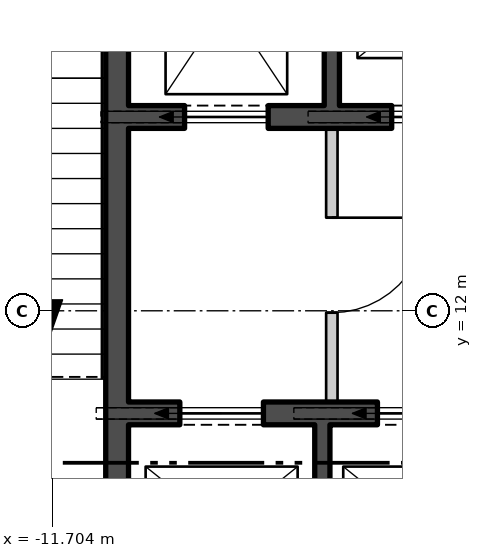
"""IFC4 building model, lengths in metres.
Left out: names, types, materials, properties, quantities, classifications, styles, units other than length and angle.
Written with IfcOpenShell. Run it as: python <this file> out.ifc"""

import sys

from ifc_helpers import new_model, si_unit, direction, frame, frame_2d, origin, place, context, subcontext, project, spatial, polyline, rectangle, outline, extrude, element, fill, save


model = new_model("IFC4")
c1 = context("Model", 3, precision=1e-05, world=origin(), true_north=direction((0.0, 1.0)))
c2 = subcontext(c1, "Body", "Model", "MODEL_VIEW")
j1 = project(units=[si_unit("LENGTHUNIT", "METRE"), si_unit("PLANEANGLEUNIT", "RADIAN")], contexts=[c1])
p1 = place(None, origin())
s1 = spatial("IfcSite", under=j1, at=p1, CompositionType="ELEMENT")
p2 = place(p1, origin())
s2 = spatial("IfcBuilding", under=s1, at=p2, CompositionType="ELEMENT")
p3 = place(p2, frame((0.0, 0.0, 280.5)))
s3 = spatial("IfcBuildingStorey", under=s2, at=p3, CompositionType="ELEMENT", Elevation=280.5)
p4 = place(p3, frame((-25.385, 15.619, -0.18), z_axis=(0.0, 0.0, 1.0), x_axis=(0.500000711659, -0.866024992908, 0.0)))
e1 = element("IfcWall", 1, at=p4, inside=s3, PredefinedType="SOLIDWALL", context=c2, shape_type="SweptSolid", body=[
    extrude(outline(polyline([(-0.13, -0.225), (45.87, -0.225), (45.61, 0.225), (0.13, 0.225), (-0.13, -0.225)])), origin(), (0.0, 0.0, 1.0), 3.68),
])
p5 = place(p4, frame((1.424, 0.0, 1.08)))
e2 = element("IfcOpeningElement", 2, at=p5, cuts=e1, PredefinedType="OPENING", context=c2, shape_type="SweptSolid", body=[
    extrude(rectangle(XDim=2.4, YDim=2.0, at=frame_2d((1.2, 1.0))), frame((0.0, 0.235, 0.0), z_axis=(0.0, -1.0, 0.0), x_axis=(1.0, 0.0, 0.0)), (0.0, 0.0, 1.0), 0.47),
])
p6 = place(p4, frame((5.893, 0.0, 1.08)))
e3 = element("IfcOpeningElement", 3, at=p6, cuts=e1, PredefinedType="OPENING", context=c2, shape_type="SweptSolid", body=[
    extrude(rectangle(XDim=2.4, YDim=2.0, at=frame_2d((1.2, 1.0))), frame((0.0, 0.235, 0.0), z_axis=(0.0, -1.0, 0.0), x_axis=(1.0, 0.0, 0.0)), (0.0, 0.0, 1.0), 0.47),
])
p7 = place(p4, frame((10.401, 0.0, 1.08)))
e4 = element("IfcOpeningElement", 4, at=p7, cuts=e1, PredefinedType="OPENING", context=c2, shape_type="SweptSolid", body=[
    extrude(rectangle(XDim=2.4, YDim=2.0, at=frame_2d((1.2, 1.0))), frame((0.0, 0.235, 0.0), z_axis=(0.0, -1.0, 0.0), x_axis=(1.0, 0.0, 0.0)), (0.0, 0.0, 1.0), 0.47),
])
p8 = place(p4, frame((14.909, 0.0, 1.08)))
e5 = element("IfcOpeningElement", 5, at=p8, cuts=e1, PredefinedType="OPENING", context=c2, shape_type="SweptSolid", body=[
    extrude(rectangle(XDim=2.4, YDim=2.0, at=frame_2d((1.2, 1.0))), frame((0.0, 0.235, 0.0), z_axis=(0.0, -1.0, 0.0), x_axis=(1.0, 0.0, 0.0)), (0.0, 0.0, 1.0), 0.47),
])
p9 = place(p4, frame((19.416, 0.0, 1.08)))
e6 = element("IfcOpeningElement", 6, at=p9, cuts=e1, PredefinedType="OPENING", context=c2, shape_type="SweptSolid", body=[
    extrude(rectangle(XDim=2.4, YDim=2.0, at=frame_2d((1.2, 1.0))), frame((0.0, 0.235, 0.0), z_axis=(0.0, -1.0, 0.0), x_axis=(1.0, 0.0, 0.0)), (0.0, 0.0, 1.0), 0.47),
])
p10 = place(p4, frame((23.924, 0.0, 1.08)))
e7 = element("IfcOpeningElement", 7, at=p10, cuts=e1, PredefinedType="OPENING", context=c2, shape_type="SweptSolid", body=[
    extrude(rectangle(XDim=2.4, YDim=2.0, at=frame_2d((1.2, 1.0))), frame((0.0, 0.235, 0.0), z_axis=(0.0, -1.0, 0.0), x_axis=(1.0, 0.0, 0.0)), (0.0, 0.0, 1.0), 0.47),
])
p11 = place(p4, frame((28.431, 0.0, 1.08)))
e8 = element("IfcOpeningElement", 8, at=p11, cuts=e1, PredefinedType="OPENING", context=c2, shape_type="SweptSolid", body=[
    extrude(rectangle(XDim=2.4, YDim=2.0, at=frame_2d((1.2, 1.0))), frame((0.0, 0.235, 0.0), z_axis=(0.0, -1.0, 0.0), x_axis=(1.0, 0.0, 0.0)), (0.0, 0.0, 1.0), 0.47),
])
p12 = place(p4, frame((32.939, 0.0, 1.08)))
e9 = element("IfcOpeningElement", 9, at=p12, cuts=e1, PredefinedType="OPENING", context=c2, shape_type="SweptSolid", body=[
    extrude(rectangle(XDim=2.4, YDim=2.0, at=frame_2d((1.2, 1.0))), frame((0.0, 0.235, 0.0), z_axis=(0.0, -1.0, 0.0), x_axis=(1.0, 0.0, 0.0)), (0.0, 0.0, 1.0), 0.47),
])
p13 = place(p4, frame((37.447, 0.0, 1.08)))
e10 = element("IfcOpeningElement", 10, at=p13, cuts=e1, PredefinedType="OPENING", context=c2, shape_type="SweptSolid", body=[
    extrude(rectangle(XDim=2.4, YDim=2.0, at=frame_2d((1.2, 1.0))), frame((0.0, 0.235, 0.0), z_axis=(0.0, -1.0, 0.0), x_axis=(1.0, 0.0, 0.0)), (0.0, 0.0, 1.0), 0.47),
])
p14 = place(p4, frame((41.916, 0.0, 1.08)))
e11 = element("IfcOpeningElement", 11, at=p14, cuts=e1, PredefinedType="OPENING", context=c2, shape_type="SweptSolid", body=[
    extrude(rectangle(XDim=2.4, YDim=2.0, at=frame_2d((1.2, 1.0))), frame((0.0, 0.235, 0.0), z_axis=(0.0, -1.0, 0.0), x_axis=(1.0, 0.0, 0.0)), (0.0, 0.0, 1.0), 0.47),
])
p15 = place(p3, frame((-10.85, 4.4, 0.0), z_axis=(0.0, 0.0, 1.0), x_axis=(0.0, 1.0, 0.0)))
e12 = element("IfcWall", 12, at=p15, inside=s3, PredefinedType="SHEAR", context=c2, shape_type="SweptSolid", body=[
    extrude(rectangle(XDim=13.2, YDim=0.3, at=frame_2d((6.6, 0.0))), origin(), (0.0, 0.0, 1.0), 3.7),
])
p16 = place(p15, frame((1.575, 0.0, 0.0)))
e13 = element("IfcOpeningElement", 13, at=p16, cuts=e12, PredefinedType="OPENING", context=c2, shape_type="SweptSolid", body=[
    extrude(rectangle(XDim=1.25, YDim=2.1, at=frame_2d((0.625, 1.05))), frame((0.0, 0.16, 0.0), z_axis=(0.0, -1.0, 0.0), x_axis=(1.0, 0.0, 0.0)), (0.0, 0.0, 1.0), 0.32),
])
p17 = place(p15, frame((0.4, 0.0, 0.0)))
e14 = element("IfcOpeningElement", 14, at=p17, cuts=e12, PredefinedType="OPENING", context=c2, shape_type="SweptSolid", body=[
    extrude(rectangle(XDim=0.9, YDim=2.1, at=frame_2d((0.45, 1.05))), frame((0.0, 0.16, 0.0), z_axis=(0.0, -1.0, 0.0), x_axis=(1.0, 0.0, 0.0)), (0.0, 0.0, 1.0), 0.32),
])
p18 = place(p3, frame((-10.7, 14.55, 0.0), z_axis=(0.0, 0.0, 1.0), x_axis=(1.0, 0.0, 0.0)))
e15 = element("IfcWall", 15, at=p18, inside=s3, PredefinedType="SHEAR", context=c2, shape_type="SweptSolid", body=[
    extrude(rectangle(XDim=21.4, YDim=0.3, at=frame_2d((10.7, 0.0))), origin(), (0.0, 0.0, 1.0), 3.7),
])
p19 = place(p18, frame((0.738, 0.0, 0.0)))
e16 = element("IfcOpeningElement", 16, at=p19, cuts=e15, PredefinedType="OPENING", context=c2, shape_type="SweptSolid", body=[
    extrude(rectangle(XDim=1.1, YDim=2.1, at=frame_2d((0.55, 1.05))), frame((0.0, 0.16, 0.0), z_axis=(0.0, -1.0, 0.0), x_axis=(1.0, 0.0, 0.0)), (0.0, 0.0, 1.0), 0.32),
])
p20 = place(p18, frame((3.462, 0.0, 0.0)))
e17 = element("IfcOpeningElement", 17, at=p20, cuts=e15, PredefinedType="OPENING", context=c2, shape_type="SweptSolid", body=[
    extrude(rectangle(XDim=1.1, YDim=2.1, at=frame_2d((0.55, 1.05))), frame((0.0, 0.16, 0.0), z_axis=(0.0, -1.0, 0.0), x_axis=(1.0, 0.0, 0.0)), (0.0, 0.0, 1.0), 0.32),
])
p21 = place(p18, frame((6.138, 0.0, 0.0)))
e18 = element("IfcOpeningElement", 18, at=p21, cuts=e15, PredefinedType="OPENING", context=c2, shape_type="SweptSolid", body=[
    extrude(rectangle(XDim=1.1, YDim=2.1, at=frame_2d((0.55, 1.05))), frame((0.0, 0.16, 0.0), z_axis=(0.0, -1.0, 0.0), x_axis=(1.0, 0.0, 0.0)), (0.0, 0.0, 1.0), 0.32),
])
p22 = place(p18, frame((8.812, 0.0, 0.0)))
e19 = element("IfcOpeningElement", 19, at=p22, cuts=e15, PredefinedType="OPENING", context=c2, shape_type="SweptSolid", body=[
    extrude(rectangle(XDim=1.1, YDim=2.1, at=frame_2d((0.55, 1.05))), frame((0.0, 0.16, 0.0), z_axis=(0.0, -1.0, 0.0), x_axis=(1.0, 0.0, 0.0)), (0.0, 0.0, 1.0), 0.32),
])
p23 = place(p18, frame((19.562, 0.0, 0.0)))
e20 = element("IfcOpeningElement", 20, at=p23, cuts=e15, PredefinedType="OPENING", context=c2, shape_type="SweptSolid", body=[
    extrude(rectangle(XDim=1.1, YDim=2.1, at=frame_2d((0.55, 1.05))), frame((0.0, 0.16, 0.0), z_axis=(0.0, -1.0, 0.0), x_axis=(1.0, 0.0, 0.0)), (0.0, 0.0, 1.0), 0.32),
])
p24 = place(p18, frame((11.537, 0.0, 0.0)))
e21 = element("IfcOpeningElement", 21, at=p24, cuts=e15, PredefinedType="OPENING", context=c2, shape_type="SweptSolid", body=[
    extrude(rectangle(XDim=1.0, YDim=2.1, at=frame_2d((0.5, 1.05))), frame((0.0, 0.16, 0.0), z_axis=(0.0, -1.0, 0.0), x_axis=(1.0, 0.0, 0.0)), (0.0, 0.0, 1.0), 0.32),
])
p25 = place(p18, frame((14.213, 0.0, 0.0)))
e22 = element("IfcOpeningElement", 22, at=p25, cuts=e15, PredefinedType="OPENING", context=c2, shape_type="SweptSolid", body=[
    extrude(rectangle(XDim=1.0, YDim=2.1, at=frame_2d((0.5, 1.05))), frame((0.0, 0.16, 0.0), z_axis=(0.0, -1.0, 0.0), x_axis=(1.0, 0.0, 0.0)), (0.0, 0.0, 1.0), 0.32),
])
p26 = place(p18, frame((16.887, 0.0, 0.0)))
e23 = element("IfcOpeningElement", 23, at=p26, cuts=e15, PredefinedType="OPENING", context=c2, shape_type="SweptSolid", body=[
    extrude(rectangle(XDim=1.0, YDim=2.1, at=frame_2d((0.5, 1.05))), frame((0.0, 0.16, 0.0), z_axis=(0.0, -1.0, 0.0), x_axis=(1.0, 0.0, 0.0)), (0.0, 0.0, 1.0), 0.32),
])
p27 = place(p3, frame((-10.7, 10.65, 0.0), z_axis=(0.0, 0.0, 1.0), x_axis=(1.0, 0.0, 0.0)))
e24 = element("IfcWall", 24, at=p27, inside=s3, PredefinedType="SHEAR", context=c2, shape_type="SweptSolid", body=[
    extrude(rectangle(XDim=10.3, YDim=0.3, at=frame_2d((5.15, 0.0))), origin(), (0.0, 0.0, 1.0), 3.7),
])
p28 = place(p27, frame((0.675, 0.0, 0.0)))
e25 = element("IfcOpeningElement", 25, at=p28, cuts=e24, PredefinedType="OPENING", context=c2, shape_type="SweptSolid", body=[
    extrude(rectangle(XDim=1.1, YDim=2.1, at=frame_2d((0.55, 1.05))), frame((0.0, 0.16, 0.0), z_axis=(0.0, -1.0, 0.0), x_axis=(1.0, 0.0, 0.0)), (0.0, 0.0, 1.0), 0.32),
])
p29 = place(p27, frame((3.275, 0.0, 0.0)))
e26 = element("IfcOpeningElement", 26, at=p29, cuts=e24, PredefinedType="OPENING", context=c2, shape_type="SweptSolid", body=[
    extrude(rectangle(XDim=1.1, YDim=2.1, at=frame_2d((0.55, 1.05))), frame((0.0, 0.16, 0.0), z_axis=(0.0, -1.0, 0.0), x_axis=(1.0, 0.0, 0.0)), (0.0, 0.0, 1.0), 0.32),
])
p30 = place(p27, frame((5.825, 0.0, 0.0)))
e27 = element("IfcOpeningElement", 27, at=p30, cuts=e24, PredefinedType="OPENING", context=c2, shape_type="SweptSolid", body=[
    extrude(rectangle(XDim=1.1, YDim=2.1, at=frame_2d((0.55, 1.05))), frame((0.0, 0.16, 0.0), z_axis=(0.0, -1.0, 0.0), x_axis=(1.0, 0.0, 0.0)), (0.0, 0.0, 1.0), 0.32),
])
p31 = place(p27, frame((8.425, 0.0, 0.0)))
e28 = element("IfcOpeningElement", 28, at=p31, cuts=e24, PredefinedType="OPENING", context=c2, shape_type="SweptSolid", body=[
    extrude(rectangle(XDim=1.0, YDim=2.1, at=frame_2d((0.5, 1.05))), frame((0.0, 0.16, 0.0), z_axis=(0.0, -1.0, 0.0), x_axis=(1.0, 0.0, 0.0)), (0.0, 0.0, 1.0), 0.32),
])
p32 = place(p3, frame((-8.025, 14.7, 0.0), z_axis=(0.0, 0.0, 1.0), x_axis=(0.0, 1.0, 0.0)))
e29 = element("IfcWall", 29, at=p32, inside=s3, PredefinedType="SHEAR", context=c2, shape_type="SweptSolid", body=[
    extrude(rectangle(XDim=2.9, YDim=0.2, at=frame_2d((1.45, 0.0))), origin(), (0.0, 0.0, 1.0), 3.7),
])
p33 = place(p3, frame((-8.15, 7.8, 0.0), z_axis=(0.0, 0.0, 1.0), x_axis=(0.0, 1.0, 0.0)))
e30 = element("IfcWall", 30, at=p33, inside=s3, PredefinedType="SHEAR", context=c2, shape_type="SweptSolid", body=[
    extrude(rectangle(XDim=2.7, YDim=0.2, at=frame_2d((1.35, 0.0))), origin(), (0.0, 0.0, 1.0), 3.7),
])
p34 = place(p3, frame((-8.025, 10.8, 0.0), z_axis=(0.0, 0.0, 1.0), x_axis=(0.0, 1.0, 0.0)))
e31 = element("IfcWall", 31, at=p34, inside=s3, PredefinedType="PARTITIONING", context=c2, shape_type="SweptSolid", body=[
    extrude(rectangle(XDim=3.6, YDim=0.15, at=frame_2d((1.8, 0.0))), origin(), (0.0, 0.0, 1.0), 3.7),
])
p35 = place(p34, frame((1.175, 0.0, 0.0)))
e32 = element("IfcOpeningElement", 32, at=p35, cuts=e31, PredefinedType="OPENING", context=c2, shape_type="SweptSolid", body=[
    extrude(rectangle(XDim=1.25, YDim=2.1, at=frame_2d((0.625, 1.05))), frame((0.0, 0.085, 0.0), z_axis=(0.0, -1.0, 0.0), x_axis=(1.0, 0.0, 0.0)), (0.0, 0.0, 1.0), 0.17),
])
p36 = place(p19, origin())
e33 = element("IfcDoor", 33, at=p36, inside=s3, OperationType="SLIDING_TO_LEFT", PredefinedType="DOOR", context=c2, shape_type="SweptSolid", body=[
    extrude(rectangle(XDim=1.1, YDim=2.1, at=frame_2d((0.55, 1.05))), frame((0.0, 0.025, 0.0), z_axis=(0.0, -1.0, 0.0), x_axis=(1.0, 0.0, 0.0)), (0.0, 0.0, 1.0), 0.05),
])
fill(e16, e33)
p37 = place(p20, origin())
e34 = element("IfcDoor", 34, at=p37, inside=s3, OperationType="SLIDING_TO_LEFT", PredefinedType="DOOR", context=c2, shape_type="SweptSolid", body=[
    extrude(rectangle(XDim=1.1, YDim=2.1, at=frame_2d((0.55, 1.05))), frame((0.0, 0.025, 0.0), z_axis=(0.0, -1.0, 0.0), x_axis=(1.0, 0.0, 0.0)), (0.0, 0.0, 1.0), 0.05),
])
fill(e17, e34)
p38 = place(p28, origin())
e35 = element("IfcDoor", 35, at=p38, inside=s3, OperationType="SLIDING_TO_LEFT", PredefinedType="DOOR", context=c2, shape_type="SweptSolid", body=[
    extrude(rectangle(XDim=1.1, YDim=2.1, at=frame_2d((0.55, 1.05))), frame((0.0, 0.025, 0.0), z_axis=(0.0, -1.0, 0.0), x_axis=(1.0, 0.0, 0.0)), (0.0, 0.0, 1.0), 0.05),
])
fill(e25, e35)
p39 = place(p29, origin())
e36 = element("IfcDoor", 36, at=p39, inside=s3, OperationType="SLIDING_TO_LEFT", PredefinedType="DOOR", context=c2, shape_type="SweptSolid", body=[
    extrude(rectangle(XDim=1.1, YDim=2.1, at=frame_2d((0.55, 1.05))), frame((0.0, 0.025, 0.0), z_axis=(0.0, -1.0, 0.0), x_axis=(1.0, 0.0, 0.0)), (0.0, 0.0, 1.0), 0.05),
])
fill(e26, e36)
p40 = place(p35, origin())
e37 = element("IfcDoor", 37, at=p40, inside=s3, OperationType="SINGLE_SWING_RIGHT", PredefinedType="DOOR", context=c2, shape_type="SweptSolid", body=[
    extrude(rectangle(XDim=1.25, YDim=2.1, at=frame_2d((0.625, 1.05))), frame((0.0, 0.025, 0.0), z_axis=(0.0, -1.0, 0.0), x_axis=(1.0, 0.0, 0.0)), (0.0, 0.0, 1.0), 0.05),
])
fill(e32, e37)
save(model, sys.argv[1])
